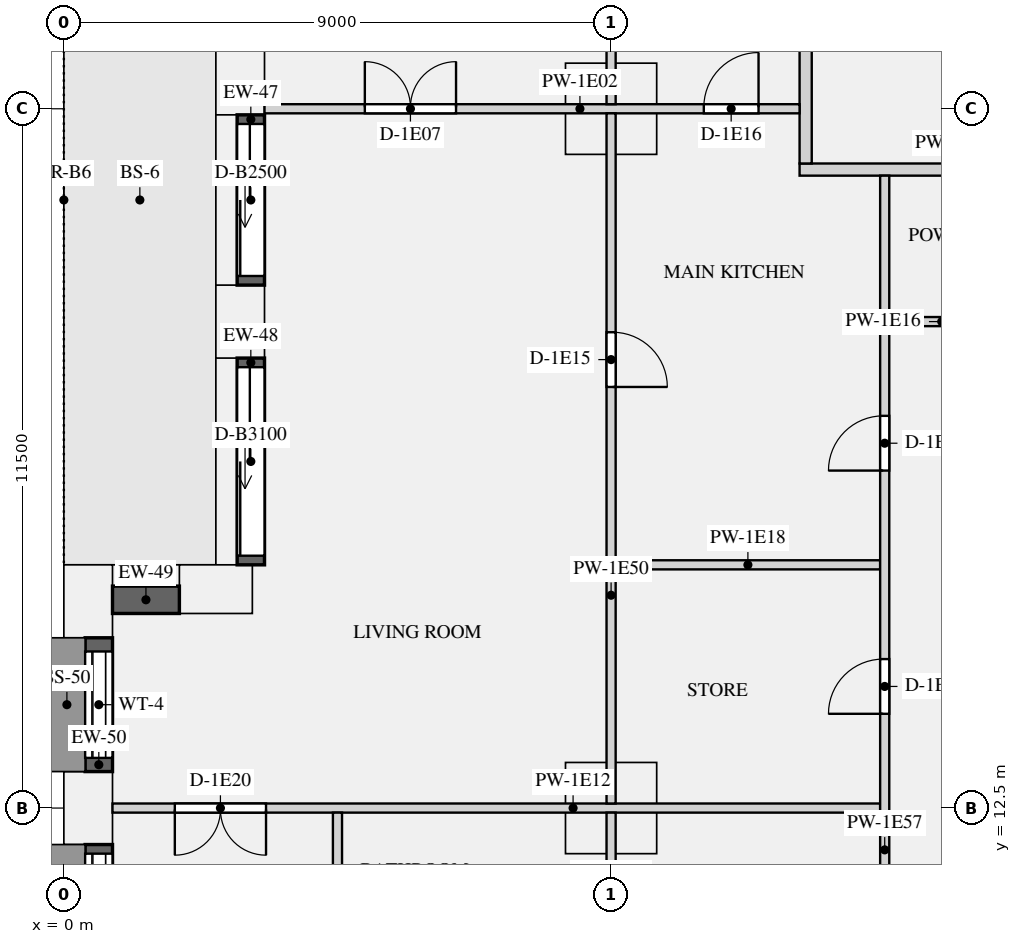
"""IFC4 building model, lengths in metres.
Left out: names, types, materials, properties, quantities, classifications, styles, units other than length and angle.
Written with IfcOpenShell. Run it as: python <this file> out.ifc"""

import sys

from ifc_helpers import new_model, si_unit, direction, frame, frame_2d, origin, origin_2d, place, context, subcontext, project, spatial, rectangle, extrude, element, fill, save


model = new_model("IFC4")
c1 = context("Model", 3, precision=1e-05, world=origin(), true_north=direction((0.0, 1.0)))
c2 = subcontext(c1, "Body", "Model", "MODEL_VIEW")
j1 = project(units=[si_unit("LENGTHUNIT", "METRE"), si_unit("PLANEANGLEUNIT", "RADIAN")], contexts=[c1])
p1 = place(None, origin())
s1 = spatial("IfcSite", under=j1, at=p1, CompositionType="ELEMENT")
p2 = place(p1, origin())
s2 = spatial("IfcBuilding", under=s1, at=p2, CompositionType="ELEMENT")
p3 = place(p2, frame((0.0, 0.0, 54.15)))
s3 = spatial("IfcBuildingStorey", under=s2, at=p3, CompositionType="ELEMENT", Elevation=54.15)
for number, where, z_axis, x_axis in (
    (1, (2.9, 24.5, 0.0), (0.0, 0.0, 1.0), (0.0, -1.0, 0.0)),
    (2, (2.9, 20.5, 0.0), (0.0, 0.0, 1.0), (0.0, -1.0, 0.0)),
    (3, (2.5, 16.1, 0.0), (0.0, 0.0, 1.0), (-1.0, 0.0, 0.0)),
    (4, (0.4, 15.9, 0.0), (0.0, 0.0, 1.0), (0.0, -1.0, 0.0)),
    (5, (0.4, 12.5, 0.0), (0.0, 0.0, 1.0), (0.0, -1.0, 0.0)),
):
    element("IfcColumn", number, at=place(p3, frame(where, z_axis=z_axis, x_axis=x_axis)), inside=s3, PredefinedType="USERDEFINED", context=c2, shape_type="SweptSolid", body=[
        extrude(rectangle(XDim=1.2, YDim=0.8, at=origin_2d()), origin(), (0.0, 0.0, 1.0), 3.15),
    ])
for number, where, z_axis, x_axis in (
    (6, (9.0, 24.0, 0.0), (0.0, 0.0, 1.0), (1.0, 0.0, 0.0)),
    (7, (9.0, 12.5, 0.0), (0.0, 0.0, 1.0), (1.0, 0.0, 0.0)),
):
    element("IfcColumn", number, at=place(p3, frame(where, z_axis=z_axis, x_axis=x_axis)), inside=s3, PredefinedType="COLUMN", context=c2, shape_type="SweptSolid", body=[
        extrude(rectangle(XDim=1.5, YDim=1.5, at=origin_2d()), origin(), (0.0, 0.0, 1.0), 3.15),
    ])
p4 = place(p3, frame((3.075, 23.9, 0.0), z_axis=(0.0, 0.0, 1.0), x_axis=(0.0, -1.0, 0.0)))
e8 = element("IfcWall", 8, at=p4, inside=s3, PredefinedType="SOLIDWALL", context=c2, shape_type="SweptSolid", body=[
    extrude(rectangle(XDim=2.8, YDim=0.45, at=frame_2d((1.4, 0.0))), origin(), (0.0, 0.0, 1.0), 2.83),
])
p5 = place(p4, frame((0.15, 0.0, 0.0)))
e9 = element("IfcOpeningElement", 9, at=p5, cuts=e8, PredefinedType="OPENING", context=c2, shape_type="SweptSolid", body=[
    extrude(rectangle(XDim=2.5, YDim=2.3, at=frame_2d((1.25, 1.15))), frame((0.0, 0.235, 0.0), z_axis=(0.0, -1.0, 0.0), x_axis=(1.0, 0.0, 0.0)), (0.0, 0.0, 1.0), 0.47),
])
p6 = place(p3, frame((3.075, 19.9, 0.0), z_axis=(0.0, 0.0, 1.0), x_axis=(0.0, -1.0, 0.0)))
e10 = element("IfcWall", 10, at=p6, inside=s3, PredefinedType="SOLIDWALL", context=c2, shape_type="SweptSolid", body=[
    extrude(rectangle(XDim=3.4, YDim=0.45, at=frame_2d((1.7, 0.0))), origin(), (0.0, 0.0, 1.0), 2.83),
])
p7 = place(p6, frame((0.15, 0.0, 0.0)))
e11 = element("IfcOpeningElement", 11, at=p7, cuts=e10, PredefinedType="OPENING", context=c2, shape_type="SweptSolid", body=[
    extrude(rectangle(XDim=3.1, YDim=2.3, at=frame_2d((1.55, 1.15))), frame((0.0, 0.235, 0.0), z_axis=(0.0, -1.0, 0.0), x_axis=(1.0, 0.0, 0.0)), (0.0, 0.0, 1.0), 0.47),
])
p8 = place(p3, frame((1.9, 15.925, 0.9), z_axis=(0.0, 0.0, 1.0), x_axis=(-1.0, 0.0, 0.0)))
e12 = element("IfcWall", 12, at=p8, inside=s3, PredefinedType="SOLIDWALL", context=c2, shape_type="SweptSolid", body=[
    extrude(rectangle(XDim=1.1, YDim=0.45, at=frame_2d((0.55, 0.0))), origin(), (0.0, 0.0, 1.0), 1.93),
])
p9 = place(p3, frame((0.575, 15.3, 0.9), z_axis=(0.0, 0.0, 1.0), x_axis=(0.0, -1.0, 0.0)))
e13 = element("IfcWall", 13, at=p9, inside=s3, PredefinedType="SOLIDWALL", context=c2, shape_type="SweptSolid", body=[
    extrude(rectangle(XDim=2.2, YDim=0.45, at=frame_2d((1.1, 0.0))), origin(), (0.0, 0.0, 1.0), 1.93),
])
p10 = place(p9, frame((0.225, 0.0, 0.15)))
e14 = element("IfcOpeningElement", 14, at=p10, cuts=e13, PredefinedType="OPENING", context=c2, shape_type="SweptSolid", body=[
    extrude(rectangle(XDim=1.75, YDim=1.5, at=frame_2d((0.875, 0.75))), frame((0.0, 0.235, 0.0), z_axis=(0.0, -1.0, 0.0), x_axis=(1.0, 0.0, 0.0)), (0.0, 0.0, 1.0), 0.47),
])
p11 = place(p3, frame((0.575, 11.9, 0.9), z_axis=(0.0, 0.0, 1.0), x_axis=(0.0, -1.0, 0.0)))
e15 = element("IfcWall", 15, at=p11, inside=s3, PredefinedType="SOLIDWALL", context=c2, shape_type="SweptSolid", body=[
    extrude(rectangle(XDim=2.8, YDim=0.45, at=frame_2d((1.4, 0.0))), origin(), (0.0, 0.0, 1.0), 1.93),
])
p12 = place(p11, frame((0.15, 0.0, 0.15)))
e16 = element("IfcOpeningElement", 16, at=p12, cuts=e15, PredefinedType="OPENING", context=c2, shape_type="SweptSolid", body=[
    extrude(rectangle(XDim=2.5, YDim=1.5, at=frame_2d((1.25, 0.75))), frame((0.0, 0.235, 0.0), z_axis=(0.0, -1.0, 0.0), x_axis=(1.0, 0.0, 0.0)), (0.0, 0.0, 1.0), 0.47),
])
p13 = place(p3, frame((12.1, 23.0, 0.0), z_axis=(0.0, 0.0, 1.0), x_axis=(1.0, 0.0, 0.0)))
e17 = element("IfcWall", 17, at=p13, inside=s3, PredefinedType="PARTITIONING", context=c2, shape_type="SweptSolid", body=[
    extrude(rectangle(XDim=5.0, YDim=0.2, at=frame_2d((2.5, 0.0))), origin(), (0.0, 0.0, 1.0), 2.83),
])
p14 = place(p3, frame((12.2, 23.1, 0.0), z_axis=(0.0, 0.0, 1.0), x_axis=(0.0, 1.0, 0.0)))
e18 = element("IfcWall", 18, at=p14, inside=s3, PredefinedType="PARTITIONING", context=c2, shape_type="SweptSolid", body=[
    extrude(rectangle(XDim=3.9, YDim=0.2, at=frame_2d((1.95, 0.0))), origin(), (0.0, 0.0, 1.0), 2.83),
])
p15 = place(p3, frame((3.3, 24.0, 0.0), z_axis=(0.0, 0.0, 1.0), x_axis=(1.0, 0.0, 0.0)))
e19 = element("IfcWall", 19, at=p15, inside=s3, PredefinedType="PARTITIONING", context=c2, shape_type="SweptSolid", body=[
    extrude(rectangle(XDim=8.8, YDim=0.15, at=frame_2d((4.4, 0.0))), origin(), (0.0, 0.0, 1.0), 2.83),
])
p16 = place(p15, frame((1.65, 0.0, 0.0)))
e20 = element("IfcOpeningElement", 20, at=p16, cuts=e19, PredefinedType="OPENING", context=c2, shape_type="SweptSolid", body=[
    extrude(rectangle(XDim=1.5, YDim=2.1, at=frame_2d((0.75, 1.05))), frame((0.0, 0.085, 0.0), z_axis=(0.0, -1.0, 0.0), x_axis=(1.0, 0.0, 0.0)), (0.0, 0.0, 1.0), 0.17),
])
p17 = place(p15, frame((7.225, 0.0, 0.0)))
e21 = element("IfcOpeningElement", 21, at=p17, cuts=e19, PredefinedType="OPENING", context=c2, shape_type="SweptSolid", body=[
    extrude(rectangle(XDim=0.9, YDim=2.1, at=frame_2d((0.45, 1.05))), frame((0.0, 0.085, 0.0), z_axis=(0.0, -1.0, 0.0), x_axis=(1.0, 0.0, 0.0)), (0.0, 0.0, 1.0), 0.17),
])
p18 = place(p3, frame((0.8, 12.5, 0.0), z_axis=(0.0, 0.0, 1.0), x_axis=(1.0, 0.0, 0.0)))
e22 = element("IfcWall", 22, at=p18, inside=s3, PredefinedType="PARTITIONING", context=c2, shape_type="SweptSolid", body=[
    extrude(rectangle(XDim=12.625, YDim=0.15, at=frame_2d((6.312, 0.0))), origin(), (0.0, 0.0, 1.0), 2.83),
])
p19 = place(p18, frame((1.025, 0.0, 0.0)))
e23 = element("IfcOpeningElement", 23, at=p19, cuts=e22, PredefinedType="OPENING", context=c2, shape_type="SweptSolid", body=[
    extrude(rectangle(XDim=1.5, YDim=2.1, at=frame_2d((0.75, 1.05))), frame((0.0, 0.085, 0.0), z_axis=(0.0, -1.0, 0.0), x_axis=(1.0, 0.0, 0.0)), (0.0, 0.0, 1.0), 0.17),
])
p20 = place(p3, frame((13.575, 20.5, 0.0), z_axis=(0.0, 0.0, 1.0), x_axis=(1.0, 0.0, 0.0)))
e24 = element("IfcWall", 24, at=p20, inside=s3, PredefinedType="PARTITIONING", context=c2, shape_type="SweptSolid", body=[
    extrude(rectangle(XDim=4.325, YDim=0.15, at=frame_2d((2.163, 0.0))), origin(), (0.0, 0.0, 1.0), 2.83),
])
p21 = place(p20, frame((1.725, 0.0, 0.0)))
e25 = element("IfcOpeningElement", 25, at=p21, cuts=e24, PredefinedType="OPENING", context=c2, shape_type="SweptSolid", body=[
    extrude(rectangle(XDim=0.9, YDim=2.1, at=frame_2d((0.45, 1.05))), frame((0.0, 0.085, 0.0), z_axis=(0.0, -1.0, 0.0), x_axis=(1.0, 0.0, 0.0)), (0.0, 0.0, 1.0), 0.17),
])
p22 = place(p3, frame((9.075, 16.5, 0.0), z_axis=(0.0, 0.0, 1.0), x_axis=(1.0, 0.0, 0.0)))
e26 = element("IfcWall", 26, at=p22, inside=s3, PredefinedType="PARTITIONING", context=c2, shape_type="SweptSolid", body=[
    extrude(rectangle(XDim=4.35, YDim=0.15, at=frame_2d((2.175, 0.0))), origin(), (0.0, 0.0, 1.0), 2.83),
])
p23 = place(p3, frame((9.0, 9.575, 0.0), z_axis=(0.0, 0.0, 1.0), x_axis=(0.0, 1.0, 0.0)))
e27 = element("IfcWall", 27, at=p23, inside=s3, PredefinedType="PARTITIONING", context=c2, shape_type="SweptSolid", body=[
    extrude(rectangle(XDim=2.85, YDim=0.15, at=frame_2d((1.425, 0.0))), origin(), (0.0, 0.0, 1.0), 2.83),
])
p24 = place(p3, frame((9.0, 12.575, 0.0), z_axis=(0.0, 0.0, 1.0), x_axis=(0.0, 1.0, 0.0)))
e28 = element("IfcWall", 28, at=p24, inside=s3, PredefinedType="PARTITIONING", context=c2, shape_type="SweptSolid", body=[
    extrude(rectangle(XDim=11.35, YDim=0.15, at=frame_2d((5.675, 0.0))), origin(), (0.0, 0.0, 1.0), 2.83),
])
p25 = place(p24, frame((6.85, 0.0, 0.0)))
e29 = element("IfcOpeningElement", 29, at=p25, cuts=e28, PredefinedType="OPENING", context=c2, shape_type="SweptSolid", body=[
    extrude(rectangle(XDim=0.9, YDim=2.1, at=frame_2d((0.45, 1.05))), frame((0.0, 0.085, 0.0), z_axis=(0.0, -1.0, 0.0), x_axis=(1.0, 0.0, 0.0)), (0.0, 0.0, 1.0), 0.17),
])
p26 = place(p3, frame((9.0, 24.075, 0.0), z_axis=(0.0, 0.0, 1.0), x_axis=(0.0, 1.0, 0.0)))
e30 = element("IfcWall", 30, at=p26, inside=s3, PredefinedType="PARTITIONING", context=c2, shape_type="SweptSolid", body=[
    extrude(rectangle(XDim=8.225, YDim=0.15, at=frame_2d((4.113, 0.0))), origin(), (0.0, 0.0, 1.0), 2.83),
])
p27 = place(p26, frame((2.1, 0.0, 0.0)))
e31 = element("IfcOpeningElement", 31, at=p27, cuts=e30, PredefinedType="OPENING", context=c2, shape_type="SweptSolid", body=[
    extrude(rectangle(XDim=0.9, YDim=2.1, at=frame_2d((0.45, 1.05))), frame((0.0, 0.085, 0.0), z_axis=(0.0, -1.0, 0.0), x_axis=(1.0, 0.0, 0.0)), (0.0, 0.0, 1.0), 0.17),
])
p28 = place(p3, frame((4.5, 5.3, 0.0), z_axis=(0.0, 0.0, 1.0), x_axis=(0.0, 1.0, 0.0)))
e32 = element("IfcWall", 32, at=p28, inside=s3, PredefinedType="PARTITIONING", context=c2, shape_type="SweptSolid", body=[
    extrude(rectangle(XDim=7.125, YDim=0.15, at=frame_2d((3.562, 0.0))), origin(), (0.0, 0.0, 1.0), 2.83),
])
p29 = place(p28, frame((2.25, 0.0, 0.0)))
e33 = element("IfcOpeningElement", 33, at=p29, cuts=e32, PredefinedType="OPENING", context=c2, shape_type="SweptSolid", body=[
    extrude(rectangle(XDim=0.9, YDim=2.1, at=frame_2d((0.45, 1.05))), frame((0.0, 0.085, 0.0), z_axis=(0.0, -1.0, 0.0), x_axis=(1.0, 0.0, 0.0)), (0.0, 0.0, 1.0), 0.17),
])
p30 = place(p3, frame((13.5, 9.575, 0.0), z_axis=(0.0, 0.0, 1.0), x_axis=(0.0, 1.0, 0.0)))
e34 = element("IfcWall", 34, at=p30, inside=s3, PredefinedType="PARTITIONING", context=c2, shape_type="SweptSolid", body=[
    extrude(rectangle(XDim=13.325, YDim=0.15, at=frame_2d((6.663, 0.0))), origin(), (0.0, 0.0, 1.0), 2.83),
])
p31 = place(p30, frame((8.475, 0.0, 0.0)))
e35 = element("IfcOpeningElement", 35, at=p31, cuts=e34, PredefinedType="OPENING", context=c2, shape_type="SweptSolid", body=[
    extrude(rectangle(XDim=0.9, YDim=2.1, at=frame_2d((0.45, 1.05))), frame((0.0, 0.085, 0.0), z_axis=(0.0, -1.0, 0.0), x_axis=(1.0, 0.0, 0.0)), (0.0, 0.0, 1.0), 0.17),
])
p32 = place(p30, frame((4.475, 0.0, 0.0)))
e36 = element("IfcOpeningElement", 36, at=p32, cuts=e34, PredefinedType="OPENING", context=c2, shape_type="SweptSolid", body=[
    extrude(rectangle(XDim=0.9, YDim=2.1, at=frame_2d((0.45, 1.05))), frame((0.0, 0.085, 0.0), z_axis=(0.0, -1.0, 0.0), x_axis=(1.0, 0.0, 0.0)), (0.0, 0.0, 1.0), 0.17),
])
p33 = place(p5, origin())
e37 = element("IfcDoor", 37, at=p33, inside=s3, OperationType="SLIDING_TO_LEFT", PredefinedType="DOOR", context=c2, shape_type="SweptSolid", body=[
    extrude(rectangle(XDim=2.5, YDim=2.3, at=frame_2d((1.25, 1.15))), frame((0.0, -0.07, 0.0), z_axis=(0.0, -1.0, 0.0), x_axis=(1.0, 0.0, 0.0)), (0.0, 0.0, 1.0), 0.05),
])
fill(e9, e37)
p34 = place(p7, origin())
e38 = element("IfcDoor", 38, at=p34, inside=s3, OperationType="SLIDING_TO_LEFT", PredefinedType="DOOR", context=c2, shape_type="SweptSolid", body=[
    extrude(rectangle(XDim=3.1, YDim=2.3, at=frame_2d((1.55, 1.15))), frame((0.0, -0.07, 0.0), z_axis=(0.0, -1.0, 0.0), x_axis=(1.0, 0.0, 0.0)), (0.0, 0.0, 1.0), 0.05),
])
fill(e11, e38)
p35 = place(p10, origin())
e39 = element("IfcWindow", 39, at=p35, inside=s3, PartitioningType="SINGLE_PANEL", PredefinedType="WINDOW", context=c2, shape_type="SweptSolid", body=[
    extrude(rectangle(XDim=1.75, YDim=1.5, at=frame_2d((0.875, 0.75))), frame((0.0, -0.065, 0.0), z_axis=(0.0, -1.0, 0.0), x_axis=(1.0, 0.0, 0.0)), (0.0, 0.0, 1.0), 0.06),
])
fill(e14, e39)
p36 = place(p12, origin())
e40 = element("IfcWindow", 40, at=p36, inside=s3, PartitioningType="SINGLE_PANEL", PredefinedType="WINDOW", context=c2, shape_type="SweptSolid", body=[
    extrude(rectangle(XDim=2.5, YDim=1.5, at=frame_2d((1.25, 0.75))), frame((0.0, -0.065, 0.0), z_axis=(0.0, -1.0, 0.0), x_axis=(1.0, 0.0, 0.0)), (0.0, 0.0, 1.0), 0.06),
])
fill(e16, e40)
p37 = place(p16, origin())
e41 = element("IfcDoor", 41, at=p37, inside=s3, OperationType="DOUBLE_DOOR_SINGLE_SWING", PredefinedType="DOOR", context=c2, shape_type="SweptSolid", body=[
    extrude(rectangle(XDim=1.5, YDim=2.1, at=frame_2d((0.75, 1.05))), frame((0.0, 0.025, 0.0), z_axis=(0.0, -1.0, 0.0), x_axis=(1.0, 0.0, 0.0)), (0.0, 0.0, 1.0), 0.05),
])
fill(e20, e41)
p38 = place(p31, origin())
e42 = element("IfcDoor", 42, at=p38, inside=s3, OperationType="SINGLE_SWING_LEFT", PredefinedType="DOOR", context=c2, shape_type="SweptSolid", body=[
    extrude(rectangle(XDim=0.9, YDim=2.1, at=frame_2d((0.45, 1.05))), frame((0.0, 0.025, 0.0), z_axis=(0.0, -1.0, 0.0), x_axis=(1.0, 0.0, 0.0)), (0.0, 0.0, 1.0), 0.05),
])
fill(e35, e42)
p39 = place(p32, origin())
e43 = element("IfcDoor", 43, at=p39, inside=s3, OperationType="SINGLE_SWING_LEFT", PredefinedType="DOOR", context=c2, shape_type="SweptSolid", body=[
    extrude(rectangle(XDim=0.9, YDim=2.1, at=frame_2d((0.45, 1.05))), frame((0.0, 0.025, 0.0), z_axis=(0.0, -1.0, 0.0), x_axis=(1.0, 0.0, 0.0)), (0.0, 0.0, 1.0), 0.05),
])
fill(e36, e43)
p40 = place(p25, frame((0.9, 0.0, 0.0), z_axis=(0.0, 0.0, 1.0), x_axis=(-1.0, 0.0, 0.0)))
e44 = element("IfcDoor", 44, at=p40, inside=s3, OperationType="SINGLE_SWING_RIGHT", PredefinedType="DOOR", context=c2, shape_type="SweptSolid", body=[
    extrude(rectangle(XDim=0.9, YDim=2.1, at=frame_2d((0.45, 1.05))), frame((0.0, 0.025, 0.0), z_axis=(0.0, -1.0, 0.0), x_axis=(1.0, 0.0, 0.0)), (0.0, 0.0, 1.0), 0.05),
])
fill(e29, e44)
p41 = place(p17, origin())
e45 = element("IfcDoor", 45, at=p41, inside=s3, OperationType="SINGLE_SWING_RIGHT", PredefinedType="DOOR", context=c2, shape_type="SweptSolid", body=[
    extrude(rectangle(XDim=0.9, YDim=2.1, at=frame_2d((0.45, 1.05))), frame((0.0, 0.025, 0.0), z_axis=(0.0, -1.0, 0.0), x_axis=(1.0, 0.0, 0.0)), (0.0, 0.0, 1.0), 0.05),
])
fill(e21, e45)
p42 = place(p19, frame((1.5, 0.0, 0.0), z_axis=(0.0, 0.0, 1.0), x_axis=(-1.0, 0.0, 0.0)))
e46 = element("IfcDoor", 46, at=p42, inside=s3, OperationType="DOUBLE_DOOR_SINGLE_SWING", PredefinedType="DOOR", context=c2, shape_type="SweptSolid", body=[
    extrude(rectangle(XDim=1.5, YDim=2.1, at=frame_2d((0.75, 1.05))), frame((0.0, 0.025, 0.0), z_axis=(0.0, -1.0, 0.0), x_axis=(1.0, 0.0, 0.0)), (0.0, 0.0, 1.0), 0.05),
])
fill(e23, e46)
save(model, sys.argv[1])
